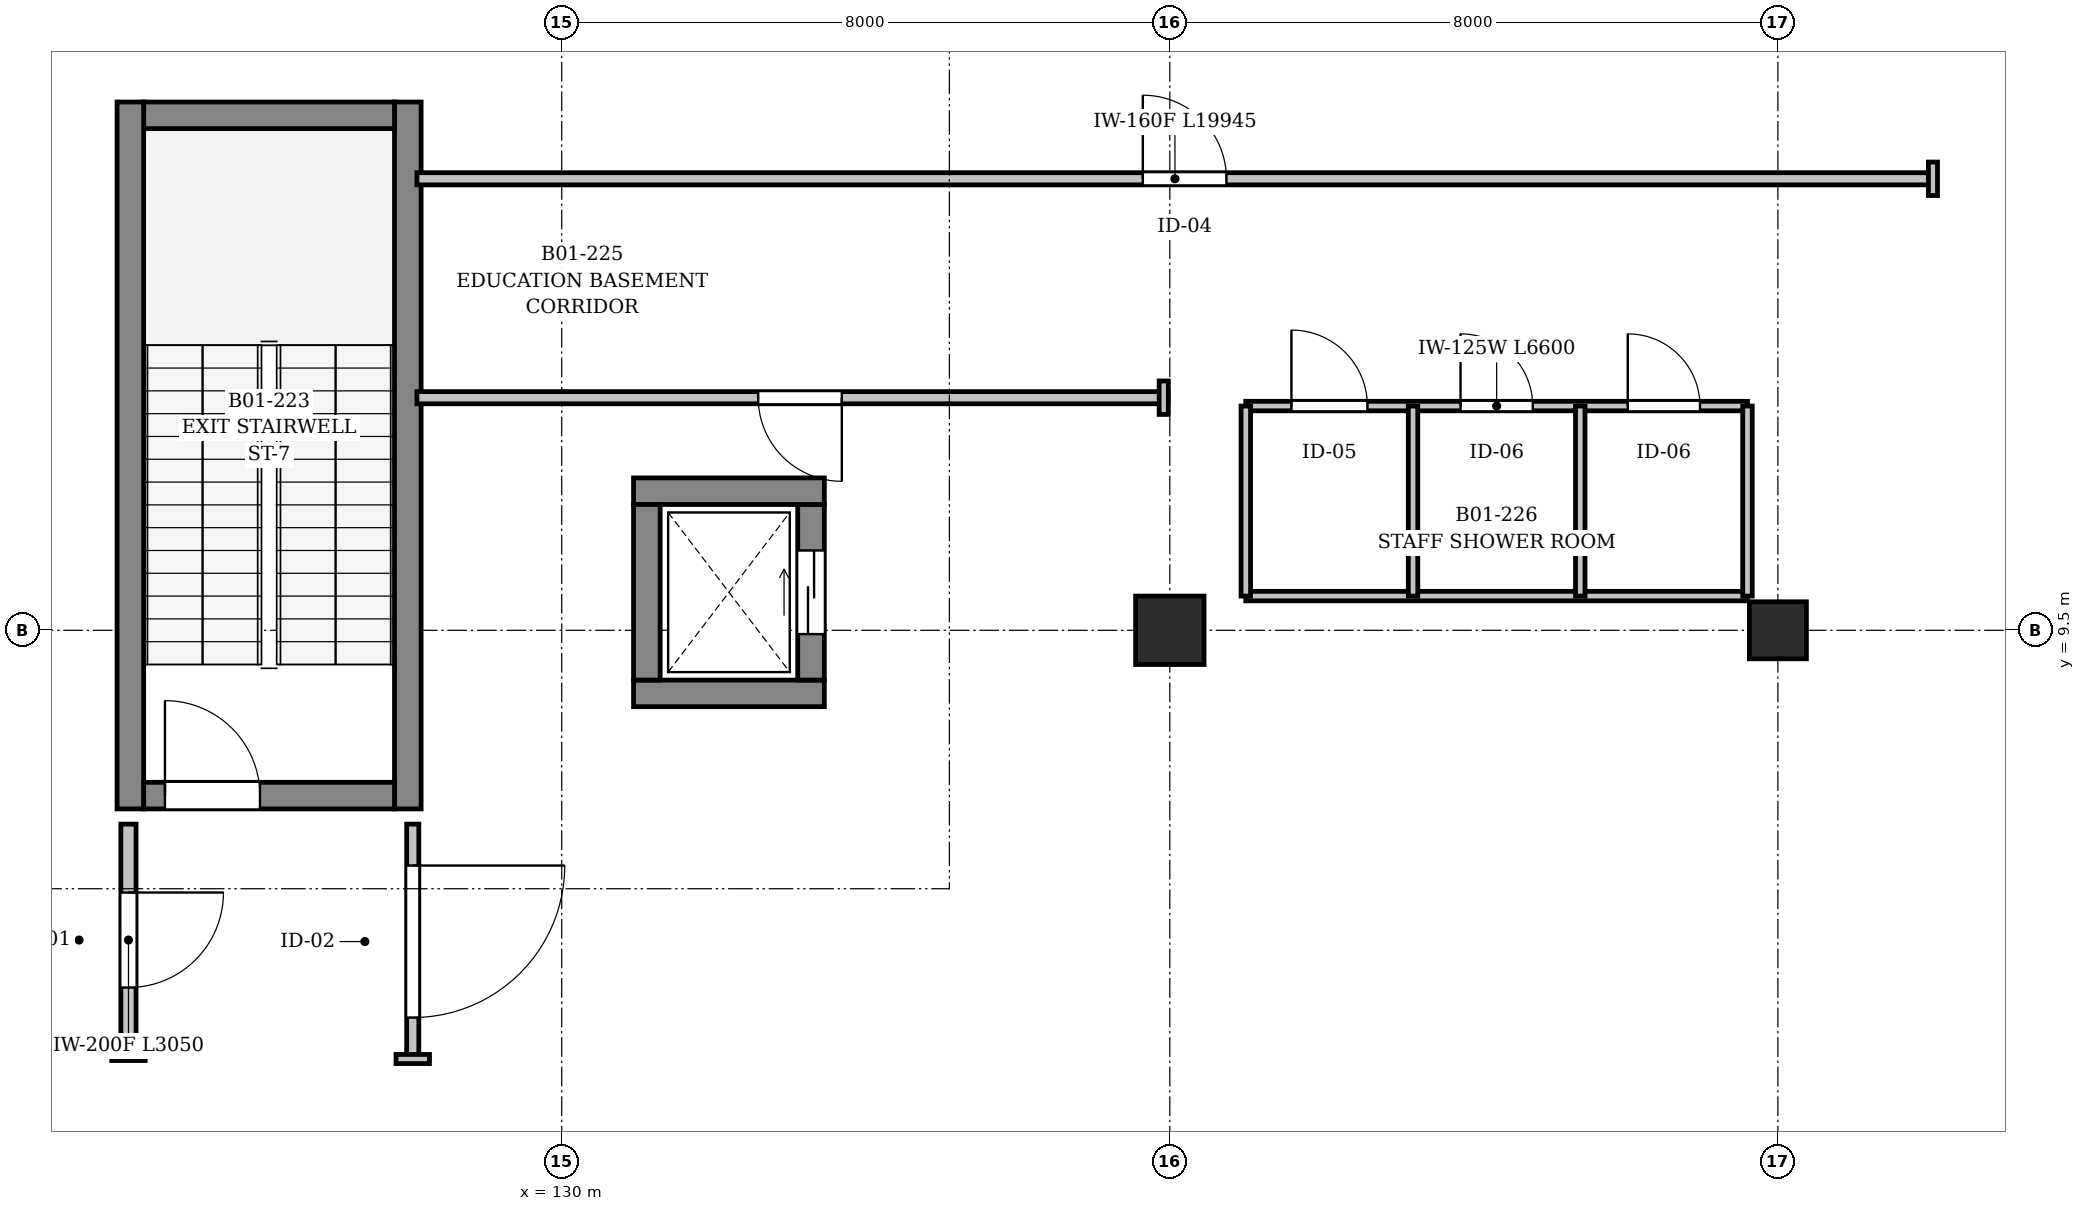
"""IFC4 building model, lengths in metres.
Left out: names, types, materials, properties, quantities, classifications, styles, units other than length and angle.
Written with IfcOpenShell. Run it as: python <this file> out.ifc"""

import sys

from ifc_helpers import new_model, si_unit, direction, frame, frame_2d, origin, origin_2d, place, context, subcontext, project, spatial, rectangle, extrude, element, fill, save


model = new_model("IFC4")
c1 = context("Model", 3, precision=1e-05, world=origin(), true_north=direction((0.0, 1.0)))
c2 = subcontext(c1, "Body", "Model", "MODEL_VIEW")
j1 = project(units=[si_unit("LENGTHUNIT", "METRE"), si_unit("PLANEANGLEUNIT", "RADIAN")], contexts=[c1])
p1 = place(None, origin())
s1 = spatial("IfcSite", under=j1, at=p1, CompositionType="ELEMENT")
p2 = place(p1, origin())
s2 = spatial("IfcBuilding", under=s1, at=p2, CompositionType="ELEMENT")
p3 = place(p2, frame((0.0, 0.0, -5.4)))
s3 = spatial("IfcBuildingStorey", under=s2, at=p3, CompositionType="ELEMENT", Elevation=-5.4)
p4 = place(p3, frame((138.0, 9.5, 0.0), z_axis=(0.0, 0.0, 1.0), x_axis=(1.0, 0.0, 0.0)))
e1 = element("IfcColumn", 1, at=p4, inside=s3, PredefinedType="COLUMN", context=c2, shape_type="SweptSolid", body=[
    extrude(rectangle(XDim=0.9, YDim=0.9, at=origin_2d()), origin(), (0.0, 0.0, 1.0), 5.05),
])
p5 = place(p3, frame((146.0, 9.5, 0.0), z_axis=(0.0, 0.0, 1.0), x_axis=(1.0, 0.0, 0.0)))
e2 = element("IfcColumn", 2, at=p5, inside=s3, PredefinedType="COLUMN", context=c2, shape_type="SweptSolid", body=[
    extrude(rectangle(XDim=0.75, YDim=0.75, at=origin_2d()), origin(), (0.0, 0.0, 1.0), 5.05),
])
p6 = place(p3, frame((127.975, 7.15, 0.0), z_axis=(0.0, 0.0, 1.0), x_axis=(0.0, 1.0, 0.0)))
e3 = element("IfcWall", 3, at=p6, inside=s3, PredefinedType="SHEAR", context=c2, shape_type="SweptSolid", body=[
    extrude(rectangle(XDim=9.3, YDim=0.35, at=frame_2d((4.65, 0.0))), origin(), (0.0, 0.0, 1.0), 5.05),
])
p7 = place(p3, frame((127.8, 16.275, 0.0), z_axis=(0.0, 0.0, 1.0), x_axis=(-1.0, 0.0, 0.0)))
e4 = element("IfcWall", 4, at=p7, inside=s3, PredefinedType="SHEAR", context=c2, shape_type="SweptSolid", body=[
    extrude(rectangle(XDim=3.3, YDim=0.35, at=frame_2d((1.65, 0.0))), origin(), (0.0, 0.0, 1.0), 5.05),
])
p8 = place(p3, frame((124.325, 16.45, 0.0), z_axis=(0.0, 0.0, 1.0), x_axis=(0.0, -1.0, 0.0)))
e5 = element("IfcWall", 5, at=p8, inside=s3, PredefinedType="SHEAR", context=c2, shape_type="SweptSolid", body=[
    extrude(rectangle(XDim=9.3, YDim=0.35, at=frame_2d((4.65, 0.0))), origin(), (0.0, 0.0, 1.0), 5.05),
])
p9 = place(p3, frame((124.5, 7.325, 0.0), z_axis=(0.0, 0.0, 1.0), x_axis=(1.0, 0.0, 0.0)))
e6 = element("IfcWall", 6, at=p9, inside=s3, PredefinedType="SHEAR", context=c2, shape_type="SweptSolid", body=[
    extrude(rectangle(XDim=3.3, YDim=0.35, at=frame_2d((1.65, 0.0))), origin(), (0.0, 0.0, 1.0), 5.05),
])
p10 = place(p9, frame((0.28, 0.0, 0.0)))
e7 = element("IfcOpeningElement", 7, at=p10, cuts=e6, PredefinedType="OPENING", context=c2, shape_type="SweptSolid", body=[
    extrude(rectangle(XDim=1.25, YDim=2.2, at=frame_2d((0.625, 1.1))), frame((0.0, 0.185, 0.0), z_axis=(0.0, -1.0, 0.0), x_axis=(1.0, 0.0, 0.0)), (0.0, 0.0, 1.0), 0.37),
])
p11 = place(p3, frame((130.945, 8.67, 0.0), z_axis=(0.0, 0.0, 1.0), x_axis=(1.0, 0.0, 0.0)))
e8 = element("IfcWall", 8, at=p11, inside=s3, PredefinedType="SHEAR", context=c2, shape_type="SweptSolid", body=[
    extrude(rectangle(XDim=2.51, YDim=0.35, at=frame_2d((1.255, 0.0))), origin(), (0.0, 0.0, 1.0), 5.05),
])
p12 = place(p3, frame((133.28, 8.845, 0.0), z_axis=(0.0, 0.0, 1.0), x_axis=(0.0, 1.0, 0.0)))
e9 = element("IfcWall", 9, at=p12, inside=s3, PredefinedType="SHEAR", context=c2, shape_type="SweptSolid", body=[
    extrude(rectangle(XDim=2.31, YDim=0.35, at=frame_2d((1.155, 0.0))), origin(), (0.0, 0.0, 1.0), 5.05),
])
p13 = place(p12, frame((0.605, 0.0, 0.0)))
e10 = element("IfcOpeningElement", 10, at=p13, cuts=e9, PredefinedType="OPENING", context=c2, shape_type="SweptSolid", body=[
    extrude(rectangle(XDim=1.1, YDim=2.2, at=frame_2d((0.55, 1.1))), frame((0.0, 0.185, 0.0), z_axis=(0.0, -1.0, 0.0), x_axis=(1.0, 0.0, 0.0)), (0.0, 0.0, 1.0), 0.37),
])
p14 = place(p3, frame((133.455, 11.33, 0.0), z_axis=(0.0, 0.0, 1.0), x_axis=(-1.0, 0.0, 0.0)))
e11 = element("IfcWall", 11, at=p14, inside=s3, PredefinedType="SHEAR", context=c2, shape_type="SweptSolid", body=[
    extrude(rectangle(XDim=2.51, YDim=0.35, at=frame_2d((1.255, 0.0))), origin(), (0.0, 0.0, 1.0), 5.05),
])
p15 = place(p3, frame((131.12, 11.155, 0.0), z_axis=(0.0, 0.0, 1.0), x_axis=(0.0, -1.0, 0.0)))
e12 = element("IfcWall", 12, at=p15, inside=s3, PredefinedType="SHEAR", context=c2, shape_type="SweptSolid", body=[
    extrude(rectangle(XDim=2.31, YDim=0.35, at=frame_2d((1.155, 0.0))), origin(), (0.0, 0.0, 1.0), 5.05),
])
p16 = place(p3, frame((139.0, 12.45, 0.0), z_axis=(0.0, 0.0, 1.0), x_axis=(1.0, 0.0, 0.0)))
e13 = element("IfcWall", 13, at=p16, inside=s3, PredefinedType="PARTITIONING", context=c2, shape_type="SweptSolid", body=[
    extrude(rectangle(XDim=6.6, YDim=0.125, at=frame_2d((3.3, 0.0))), origin(), (0.0, 0.0, 1.0), 4.29),
])
p17 = place(p16, frame((0.6, 0.0, 0.0)))
e14 = element("IfcOpeningElement", 14, at=p17, cuts=e13, PredefinedType="OPENING", context=c2, shape_type="SweptSolid", body=[
    extrude(rectangle(XDim=1.0, YDim=2.2, at=frame_2d((0.5, 1.1))), frame((0.0, 0.073, 0.0), z_axis=(0.0, -1.0, 0.0), x_axis=(1.0, 0.0, 0.0)), (0.0, 0.0, 1.0), 0.145),
])
p18 = place(p16, frame((2.825, 0.0, 0.0)))
e15 = element("IfcOpeningElement", 15, at=p18, cuts=e13, PredefinedType="OPENING", context=c2, shape_type="SweptSolid", body=[
    extrude(rectangle(XDim=0.95, YDim=2.2, at=frame_2d((0.475, 1.1))), frame((0.0, 0.073, 0.0), z_axis=(0.0, -1.0, 0.0), x_axis=(1.0, 0.0, 0.0)), (0.0, 0.0, 1.0), 0.145),
])
p19 = place(p16, frame((5.025, 0.0, 0.0)))
e16 = element("IfcOpeningElement", 16, at=p19, cuts=e13, PredefinedType="OPENING", context=c2, shape_type="SweptSolid", body=[
    extrude(rectangle(XDim=0.95, YDim=2.2, at=frame_2d((0.475, 1.1))), frame((0.0, 0.073, 0.0), z_axis=(0.0, -1.0, 0.0), x_axis=(1.0, 0.0, 0.0)), (0.0, 0.0, 1.0), 0.145),
])
p20 = place(p3, frame((139.0, 9.95, 0.0), z_axis=(0.0, 0.0, 1.0), x_axis=(1.0, 0.0, 0.0)))
e17 = element("IfcWall", 17, at=p20, inside=s3, PredefinedType="PARTITIONING", context=c2, shape_type="SweptSolid", body=[
    extrude(rectangle(XDim=6.6, YDim=0.125, at=frame_2d((3.3, 0.0))), origin(), (0.0, 0.0, 1.0), 4.29),
])
for number, where, z_axis, x_axis in (
    (18, (139.0, 9.95, 0.0), (0.0, 0.0, 1.0), (0.0, 1.0, 0.0)),
    (19, (145.6, 9.95, 0.0), (0.0, 0.0, 1.0), (0.0, 1.0, 0.0)),
    (20, (141.2, 9.95, 0.0), (0.0, 0.0, 1.0), (0.0, 1.0, 0.0)),
):
    element("IfcWall", number, at=place(p3, frame(where, z_axis=z_axis, x_axis=x_axis)), inside=s3, PredefinedType="PARTITIONING", context=c2, shape_type="SweptSolid", body=[
        extrude(rectangle(XDim=2.5, YDim=0.125, at=frame_2d((1.25, 0.0))), origin(), (0.0, 0.0, 1.0), 5.05),
    ])
p21 = place(p3, frame((143.4, 9.95, 0.0), z_axis=(0.0, 0.0, 1.0), x_axis=(0.0, 1.0, 0.0)))
e21 = element("IfcWall", 21, at=p21, inside=s3, PredefinedType="PARTITIONING", context=c2, shape_type="SweptSolid", body=[
    extrude(rectangle(XDim=2.5, YDim=0.125, at=frame_2d((1.25, 0.0))), origin(), (0.0, 0.0, 1.0), 4.29),
])
p22 = place(p3, frame((124.3, 6.95, 0.0), z_axis=(0.0, 0.0, 1.0), x_axis=(0.0, -1.0, 0.0)))
e22 = element("IfcWall", 22, at=p22, inside=s3, PredefinedType="PARTITIONING", context=c2, shape_type="SweptSolid", body=[
    extrude(rectangle(XDim=3.05, YDim=0.2, at=frame_2d((1.525, 0.0))), origin(), (0.0, 0.0, 1.0), 5.05),
])
p23 = place(p22, frame((0.9, 0.0, 0.0)))
e23 = element("IfcOpeningElement", 23, at=p23, cuts=e22, PredefinedType="OPENING", context=c2, shape_type="SweptSolid", body=[
    extrude(rectangle(XDim=1.25, YDim=2.2, at=frame_2d((0.625, 1.1))), frame((0.0, 0.11, 0.0), z_axis=(0.0, -1.0, 0.0), x_axis=(1.0, 0.0, 0.0)), (0.0, 0.0, 1.0), 0.22),
])
p24 = place(p3, frame((128.095, 15.44, 0.0), z_axis=(0.0, 0.0, 1.0), x_axis=(1.0, 0.0, 0.0)))
e24 = element("IfcWall", 24, at=p24, inside=s3, PredefinedType="PARTITIONING", context=c2, shape_type="SweptSolid", body=[
    extrude(rectangle(XDim=19.945, YDim=0.16, at=frame_2d((9.973, 0.0))), origin(), (0.0, 0.0, 1.0), 4.29),
])
p25 = place(p24, frame((9.55, 0.0, 0.0)))
e25 = element("IfcOpeningElement", 25, at=p25, cuts=e24, PredefinedType="OPENING", context=c2, shape_type="SweptSolid", body=[
    extrude(rectangle(XDim=1.1, YDim=2.2, at=frame_2d((0.55, 1.1))), frame((0.0, 0.09, 0.0), z_axis=(0.0, -1.0, 0.0), x_axis=(1.0, 0.0, 0.0)), (0.0, 0.0, 1.0), 0.18),
])
p26 = place(p3, frame((137.92, 12.56, 0.0), z_axis=(0.0, 0.0, 1.0), x_axis=(-1.0, 0.0, 0.0)))
e26 = element("IfcWall", 26, at=p26, inside=s3, PredefinedType="PARTITIONING", context=c2, shape_type="SweptSolid", body=[
    extrude(rectangle(XDim=9.825, YDim=0.16, at=frame_2d((4.913, 0.0))), origin(), (0.0, 0.0, 1.0), 4.39),
])
p27 = place(p26, frame((4.235, 0.0, 0.0)))
e27 = element("IfcOpeningElement", 27, at=p27, cuts=e26, PredefinedType="OPENING", context=c2, shape_type="SweptSolid", body=[
    extrude(rectangle(XDim=1.1, YDim=2.2, at=frame_2d((0.55, 1.1))), frame((0.0, 0.09, 0.0), z_axis=(0.0, -1.0, 0.0), x_axis=(1.0, 0.0, 0.0)), (0.0, 0.0, 1.0), 0.18),
])
p28 = place(p3, frame((128.04, 6.95, 0.0), z_axis=(0.0, 0.0, 1.0), x_axis=(0.0, -1.0, 0.0)))
e28 = element("IfcWall", 28, at=p28, inside=s3, PredefinedType="PARTITIONING", context=c2, shape_type="SweptSolid", body=[
    extrude(rectangle(XDim=3.09, YDim=0.16, at=frame_2d((1.545, 0.0))), origin(), (0.0, 0.0, 1.0), 5.05),
])
p29 = place(p28, frame((0.545, 0.0, 0.0)))
e29 = element("IfcOpeningElement", 29, at=p29, cuts=e28, PredefinedType="OPENING", context=c2, shape_type="SweptSolid", body=[
    extrude(rectangle(XDim=2.0, YDim=2.4, at=frame_2d((1.0, 1.2))), frame((0.0, 0.09, 0.0), z_axis=(0.0, -1.0, 0.0), x_axis=(1.0, 0.0, 0.0)), (0.0, 0.0, 1.0), 0.18),
])
for number, where, z_axis, x_axis in (
    (30, (124.08, 3.9, 0.0), (0.0, 0.0, 1.0), (1.0, 0.0, 0.0)),
    (31, (148.04, 15.22, 0.0), (0.0, 0.0, 1.0), (0.0, 1.0, 0.0)),
):
    element("IfcWall", number, at=place(p3, frame(where, z_axis=z_axis, x_axis=x_axis)), inside=s3, PredefinedType="PARTITIONING", context=c2, shape_type="SweptSolid", body=[
        extrude(rectangle(XDim=0.44, YDim=0.12, at=frame_2d((0.22, 0.0))), origin(), (0.0, 0.0, 1.0), 5.05),
    ])
p30 = place(p3, frame((137.92, 12.78, 0.0), z_axis=(0.0, 0.0, 1.0), x_axis=(0.0, -1.0, 0.0)))
e32 = element("IfcWall", 32, at=p30, inside=s3, PredefinedType="PARTITIONING", context=c2, shape_type="SweptSolid", body=[
    extrude(rectangle(XDim=0.44, YDim=0.12, at=frame_2d((0.22, 0.0))), origin(), (0.0, 0.0, 1.0), 4.39),
])
p31 = place(p3, frame((127.82, 3.86, 0.0), z_axis=(0.0, 0.0, 1.0), x_axis=(1.0, 0.0, 0.0)))
e33 = element("IfcWall", 33, at=p31, inside=s3, PredefinedType="PARTITIONING", context=c2, shape_type="SweptSolid", body=[
    extrude(rectangle(XDim=0.44, YDim=0.12, at=frame_2d((0.22, 0.0))), origin(), (0.0, 0.0, 1.0), 5.05),
])
p32 = place(p10, origin())
e34 = element("IfcDoor", 34, at=p32, inside=s3, OperationType="SINGLE_SWING_LEFT", PredefinedType="DOOR", context=c2, shape_type="SweptSolid", body=[
    extrude(rectangle(XDim=1.25, YDim=2.2, at=frame_2d((0.625, 1.1))), frame((0.0, 0.025, 0.0), z_axis=(0.0, -1.0, 0.0), x_axis=(1.0, 0.0, 0.0)), (0.0, 0.0, 1.0), 0.05),
])
fill(e7, e34)
p33 = place(p13, origin())
e35 = element("IfcDoor", 35, at=p33, inside=s3, OperationType="SLIDING_TO_LEFT", PredefinedType="DOOR", context=c2, shape_type="SweptSolid", body=[
    extrude(rectangle(XDim=1.1, YDim=2.2, at=frame_2d((0.55, 1.1))), frame((0.0, 0.025, 0.0), z_axis=(0.0, -1.0, 0.0), x_axis=(1.0, 0.0, 0.0)), (0.0, 0.0, 1.0), 0.05),
])
fill(e10, e35)
p34 = place(p17, origin())
e36 = element("IfcDoor", 36, at=p34, inside=s3, OperationType="SINGLE_SWING_LEFT", PredefinedType="DOOR", context=c2, shape_type="SweptSolid", body=[
    extrude(rectangle(XDim=1.0, YDim=2.2, at=frame_2d((0.5, 1.1))), frame((0.0, 0.025, 0.0), z_axis=(0.0, -1.0, 0.0), x_axis=(1.0, 0.0, 0.0)), (0.0, 0.0, 1.0), 0.05),
])
fill(e14, e36)
p35 = place(p18, origin())
e37 = element("IfcDoor", 37, at=p35, inside=s3, OperationType="SINGLE_SWING_RIGHT", PredefinedType="DOOR", context=c2, shape_type="SweptSolid", body=[
    extrude(rectangle(XDim=0.95, YDim=2.2, at=frame_2d((0.475, 1.1))), frame((0.0, 0.025, 0.0), z_axis=(0.0, -1.0, 0.0), x_axis=(1.0, 0.0, 0.0)), (0.0, 0.0, 1.0), 0.05),
])
fill(e15, e37)
p36 = place(p19, origin())
e38 = element("IfcDoor", 38, at=p36, inside=s3, OperationType="SINGLE_SWING_LEFT", PredefinedType="DOOR", context=c2, shape_type="SweptSolid", body=[
    extrude(rectangle(XDim=0.95, YDim=2.2, at=frame_2d((0.475, 1.1))), frame((0.0, 0.025, 0.0), z_axis=(0.0, -1.0, 0.0), x_axis=(1.0, 0.0, 0.0)), (0.0, 0.0, 1.0), 0.05),
])
fill(e16, e38)
p37 = place(p23, origin())
e39 = element("IfcDoor", 39, at=p37, inside=s3, OperationType="SINGLE_SWING_LEFT", PredefinedType="DOOR", context=c2, shape_type="SweptSolid", body=[
    extrude(rectangle(XDim=1.25, YDim=2.2, at=frame_2d((0.625, 1.1))), frame((0.0, 0.025, 0.0), z_axis=(0.0, -1.0, 0.0), x_axis=(1.0, 0.0, 0.0)), (0.0, 0.0, 1.0), 0.05),
])
fill(e23, e39)
p38 = place(p25, origin())
e40 = element("IfcDoor", 40, at=p38, inside=s3, OperationType="SINGLE_SWING_RIGHT", PredefinedType="DOOR", context=c2, shape_type="SweptSolid", body=[
    extrude(rectangle(XDim=1.1, YDim=2.2, at=frame_2d((0.55, 1.1))), frame((0.0, 0.025, 0.0), z_axis=(0.0, -1.0, 0.0), x_axis=(1.0, 0.0, 0.0)), (0.0, 0.0, 1.0), 0.05),
])
fill(e25, e40)
p39 = place(p27, origin())
e41 = element("IfcDoor", 41, at=p39, inside=s3, OperationType="SINGLE_SWING_LEFT", PredefinedType="DOOR", context=c2, shape_type="SweptSolid", body=[
    extrude(rectangle(XDim=1.1, YDim=2.2, at=frame_2d((0.55, 1.1))), frame((0.0, 0.025, 0.0), z_axis=(0.0, -1.0, 0.0), x_axis=(1.0, 0.0, 0.0)), (0.0, 0.0, 1.0), 0.05),
])
fill(e27, e41)
p40 = place(p29, origin())
e42 = element("IfcDoor", 42, at=p40, inside=s3, OperationType="DOUBLE_DOOR_DOUBLE_SWING", PredefinedType="DOOR", context=c2, shape_type="SweptSolid", body=[
    extrude(rectangle(XDim=2.0, YDim=2.4, at=frame_2d((1.0, 1.2))), frame((0.0, 0.025, 0.0), z_axis=(0.0, -1.0, 0.0), x_axis=(1.0, 0.0, 0.0)), (0.0, 0.0, 1.0), 0.05),
])
fill(e29, e42)
save(model, sys.argv[1])
